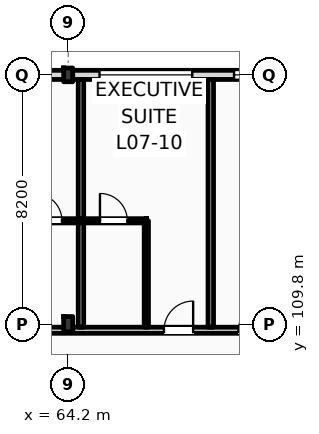
"""IFC4 building model, lengths in metres.
Left out: names, types, materials, properties, quantities, classifications, styles, units other than length and angle.
Written with IfcOpenShell. Run it as: python <this file> out.ifc"""

import sys

from ifc_helpers import new_model, si_unit, direction, frame, frame_2d, origin, origin_2d, place, context, subcontext, project, spatial, rectangle, i_section, extrude, element, fill, save


model = new_model("IFC4")
c1 = context("Model", 3, precision=1e-05, world=origin(), true_north=direction((0.0, 1.0)))
c2 = subcontext(c1, "Body", "Model", "MODEL_VIEW")
j1 = project(units=[si_unit("LENGTHUNIT", "METRE"), si_unit("PLANEANGLEUNIT", "RADIAN")], contexts=[c1])
p1 = place(None, origin())
s1 = spatial("IfcSite", under=j1, at=p1, CompositionType="ELEMENT")
p2 = place(p1, origin())
s2 = spatial("IfcBuilding", under=s1, at=p2, CompositionType="ELEMENT")
p3 = place(p2, frame((0.0, 0.0, 31.8)))
s3 = spatial("IfcBuildingStorey", under=s2, at=p3, CompositionType="ELEMENT", Elevation=31.8)
p4 = place(p3, frame((64.2, 109.8, 0.0), z_axis=(0.0, 0.0, 1.0), x_axis=(1.0, 0.0, 0.0)))
e1 = element("IfcColumn", 1, at=p4, inside=s3, PredefinedType="COLUMN", context=c2, shape_type="SweptSolid", body=[
    extrude(i_section(OverallWidth=0.3, OverallDepth=0.5, WebThickness=0.014, FlangeThickness=0.028, FilletRadius=0.027, at=origin_2d()), origin(), (0.0, 0.0, 1.0), 3.6),
])
p5 = place(p3, frame((64.2, 118.0, 0.0), z_axis=(0.0, 0.0, 1.0), x_axis=(1.0, 0.0, 0.0)))
e2 = element("IfcColumn", 2, at=p5, inside=s3, PredefinedType="COLUMN", context=c2, shape_type="SweptSolid", body=[
    extrude(i_section(OverallWidth=0.3, OverallDepth=0.45, WebThickness=0.014, FlangeThickness=0.026, FilletRadius=0.027, at=origin_2d()), origin(), (0.0, 0.0, 1.0), 3.6),
])
p6 = place(p3, frame((22.5, 118.0, 0.0), z_axis=(0.0, 0.0, 1.0), x_axis=(1.0, 0.0, 0.0)))
e3 = element("IfcWall", 3, at=p6, inside=s3, PredefinedType="STANDARD", context=c2, shape_type="SweptSolid", body=[
    extrude(rectangle(XDim=97.5, YDim=0.3, at=frame_2d((48.75, 0.0))), origin(), (0.0, 0.0, 1.0), 2.72),
])
p7 = place(p6, frame((3.61, 0.0, 0.9)))
e4 = element("IfcOpeningElement", 4, at=p7, cuts=e3, PredefinedType="OPENING", context=c2, shape_type="SweptSolid", body=[
    extrude(rectangle(XDim=1.1, YDim=1.64, at=frame_2d((0.55, 0.82))), frame((0.0, 0.16, 0.0), z_axis=(0.0, -1.0, 0.0), x_axis=(1.0, 0.0, 0.0)), (0.0, 0.0, 1.0), 0.32),
])
p8 = place(p6, frame((6.855, 0.0, 0.0)))
e5 = element("IfcOpeningElement", 5, at=p8, cuts=e3, PredefinedType="OPENING", context=c2, shape_type="SweptSolid", body=[
    extrude(rectangle(XDim=1.2, YDim=2.25, at=frame_2d((0.6, 1.125))), frame((0.0, 0.16, 0.0), z_axis=(0.0, -1.0, 0.0), x_axis=(1.0, 0.0, 0.0)), (0.0, 0.0, 1.0), 0.32),
])
p9 = place(p6, frame((11.405, 0.0, 0.9)))
e6 = element("IfcOpeningElement", 6, at=p9, cuts=e3, PredefinedType="OPENING", context=c2, shape_type="SweptSolid", body=[
    extrude(rectangle(XDim=2.1, YDim=1.64, at=frame_2d((1.05, 0.82))), frame((0.0, 0.16, 0.0), z_axis=(0.0, -1.0, 0.0), x_axis=(1.0, 0.0, 0.0)), (0.0, 0.0, 1.0), 0.32),
])
p10 = place(p6, frame((15.13, 0.0, 0.9)))
e7 = element("IfcOpeningElement", 7, at=p10, cuts=e3, PredefinedType="OPENING", context=c2, shape_type="SweptSolid", body=[
    extrude(rectangle(XDim=2.25, YDim=1.64, at=frame_2d((1.125, 0.82))), frame((0.0, 0.16, 0.0), z_axis=(0.0, -1.0, 0.0), x_axis=(1.0, 0.0, 0.0)), (0.0, 0.0, 1.0), 0.32),
])
p11 = place(p6, frame((21.53, 0.0, 0.0)))
e8 = element("IfcOpeningElement", 8, at=p11, cuts=e3, PredefinedType="OPENING", context=c2, shape_type="SweptSolid", body=[
    extrude(rectangle(XDim=1.2, YDim=2.25, at=frame_2d((0.6, 1.125))), frame((0.0, 0.16, 0.0), z_axis=(0.0, -1.0, 0.0), x_axis=(1.0, 0.0, 0.0)), (0.0, 0.0, 1.0), 0.32),
])
p12 = place(p6, frame((24.18, 0.0, 0.9)))
e9 = element("IfcOpeningElement", 9, at=p12, cuts=e3, PredefinedType="OPENING", context=c2, shape_type="SweptSolid", body=[
    extrude(rectangle(XDim=1.1, YDim=1.64, at=frame_2d((0.55, 0.82))), frame((0.0, 0.16, 0.0), z_axis=(0.0, -1.0, 0.0), x_axis=(1.0, 0.0, 0.0)), (0.0, 0.0, 1.0), 0.32),
])
p13 = place(p6, frame((29.105, 0.0, 0.9)))
e10 = element("IfcOpeningElement", 10, at=p13, cuts=e3, PredefinedType="OPENING", context=c2, shape_type="SweptSolid", body=[
    extrude(rectangle(XDim=2.7, YDim=1.64, at=frame_2d((1.35, 0.82))), frame((0.0, 0.16, 0.0), z_axis=(0.0, -1.0, 0.0), x_axis=(1.0, 0.0, 0.0)), (0.0, 0.0, 1.0), 0.32),
])
p14 = place(p6, frame((34.83, 0.0, 0.9)))
e11 = element("IfcOpeningElement", 11, at=p14, cuts=e3, PredefinedType="OPENING", context=c2, shape_type="SweptSolid", body=[
    extrude(rectangle(XDim=1.8, YDim=1.64, at=frame_2d((0.9, 0.82))), frame((0.0, 0.16, 0.0), z_axis=(0.0, -1.0, 0.0), x_axis=(1.0, 0.0, 0.0)), (0.0, 0.0, 1.0), 0.32),
])
p15 = place(p6, frame((38.525, 0.0, 0.0)))
e12 = element("IfcOpeningElement", 12, at=p15, cuts=e3, PredefinedType="OPENING", context=c2, shape_type="SweptSolid", body=[
    extrude(rectangle(XDim=1.2, YDim=2.25, at=frame_2d((0.6, 1.125))), frame((0.0, 0.16, 0.0), z_axis=(0.0, -1.0, 0.0), x_axis=(1.0, 0.0, 0.0)), (0.0, 0.0, 1.0), 0.32),
])
p16 = place(p6, frame((42.73, 0.0, 0.9)))
e13 = element("IfcOpeningElement", 13, at=p16, cuts=e3, PredefinedType="OPENING", context=c2, shape_type="SweptSolid", body=[
    extrude(rectangle(XDim=3.05, YDim=1.64, at=frame_2d((1.525, 0.82))), frame((0.0, 0.16, 0.0), z_axis=(0.0, -1.0, 0.0), x_axis=(1.0, 0.0, 0.0)), (0.0, 0.0, 1.0), 0.32),
])
p17 = place(p6, frame((47.155, 0.0, 0.9)))
e14 = element("IfcOpeningElement", 14, at=p17, cuts=e3, PredefinedType="OPENING", context=c2, shape_type="SweptSolid", body=[
    extrude(rectangle(XDim=1.35, YDim=1.64, at=frame_2d((0.675, 0.82))), frame((0.0, 0.16, 0.0), z_axis=(0.0, -1.0, 0.0), x_axis=(1.0, 0.0, 0.0)), (0.0, 0.0, 1.0), 0.32),
])
p18 = place(p6, frame((53.065, 0.0, 0.0)))
e15 = element("IfcOpeningElement", 15, at=p18, cuts=e3, PredefinedType="OPENING", context=c2, shape_type="SweptSolid", body=[
    extrude(rectangle(XDim=1.2, YDim=2.25, at=frame_2d((0.6, 1.125))), frame((0.0, 0.16, 0.0), z_axis=(0.0, -1.0, 0.0), x_axis=(1.0, 0.0, 0.0)), (0.0, 0.0, 1.0), 0.32),
])
p19 = place(p6, frame((58.2, 0.0, 0.9)))
e16 = element("IfcOpeningElement", 16, at=p19, cuts=e3, PredefinedType="OPENING", context=c2, shape_type="SweptSolid", body=[
    extrude(rectangle(XDim=1.8, YDim=1.64, at=frame_2d((0.9, 0.82))), frame((0.0, 0.16, 0.0), z_axis=(0.0, -1.0, 0.0), x_axis=(1.0, 0.0, 0.0)), (0.0, 0.0, 1.0), 0.32),
])
p20 = place(p6, frame((61.13, 0.0, 0.9)))
e17 = element("IfcOpeningElement", 17, at=p20, cuts=e3, PredefinedType="OPENING", context=c2, shape_type="SweptSolid", body=[
    extrude(rectangle(XDim=3.05, YDim=1.64, at=frame_2d((1.525, 0.82))), frame((0.0, 0.16, 0.0), z_axis=(0.0, -1.0, 0.0), x_axis=(1.0, 0.0, 0.0)), (0.0, 0.0, 1.0), 0.32),
])
p21 = place(p6, frame((67.93, 0.0, 0.0)))
e18 = element("IfcOpeningElement", 18, at=p21, cuts=e3, PredefinedType="OPENING", context=c2, shape_type="SweptSolid", body=[
    extrude(rectangle(XDim=1.2, YDim=2.25, at=frame_2d((0.6, 1.125))), frame((0.0, 0.16, 0.0), z_axis=(0.0, -1.0, 0.0), x_axis=(1.0, 0.0, 0.0)), (0.0, 0.0, 1.0), 0.32),
])
p22 = place(p6, frame((70.39, 0.0, 0.0)))
e19 = element("IfcOpeningElement", 19, at=p22, cuts=e3, PredefinedType="OPENING", context=c2, shape_type="SweptSolid", body=[
    extrude(rectangle(XDim=1.2, YDim=2.25, at=frame_2d((0.6, 1.125))), frame((0.0, 0.16, 0.0), z_axis=(0.0, -1.0, 0.0), x_axis=(1.0, 0.0, 0.0)), (0.0, 0.0, 1.0), 0.32),
])
p23 = place(p6, frame((75.905, 0.0, 0.9)))
e20 = element("IfcOpeningElement", 20, at=p23, cuts=e3, PredefinedType="OPENING", context=c2, shape_type="SweptSolid", body=[
    extrude(rectangle(XDim=1.1, YDim=1.5, at=frame_2d((0.55, 0.75))), frame((0.0, 0.16, 0.0), z_axis=(0.0, -1.0, 0.0), x_axis=(1.0, 0.0, 0.0)), (0.0, 0.0, 1.0), 0.32),
])
p24 = place(p6, frame((81.63, 0.0, 0.9)))
e21 = element("IfcOpeningElement", 21, at=p24, cuts=e3, PredefinedType="OPENING", context=c2, shape_type="SweptSolid", body=[
    extrude(rectangle(XDim=1.1, YDim=1.6, at=frame_2d((0.55, 0.8))), frame((0.0, 0.16, 0.0), z_axis=(0.0, -1.0, 0.0), x_axis=(1.0, 0.0, 0.0)), (0.0, 0.0, 1.0), 0.32),
])
p25 = place(p6, frame((84.955, 0.0, 0.9)))
e22 = element("IfcOpeningElement", 22, at=p25, cuts=e3, PredefinedType="OPENING", context=c2, shape_type="SweptSolid", body=[
    extrude(rectangle(XDim=1.4, YDim=1.64, at=frame_2d((0.7, 0.82))), frame((0.0, 0.16, 0.0), z_axis=(0.0, -1.0, 0.0), x_axis=(1.0, 0.0, 0.0)), (0.0, 0.0, 1.0), 0.32),
])
p26 = place(p6, frame((90.055, 0.0, 0.9)))
e23 = element("IfcOpeningElement", 23, at=p26, cuts=e3, PredefinedType="OPENING", context=c2, shape_type="SweptSolid", body=[
    extrude(rectangle(XDim=1.6, YDim=1.64, at=frame_2d((0.8, 0.82))), frame((0.0, 0.16, 0.0), z_axis=(0.0, -1.0, 0.0), x_axis=(1.0, 0.0, 0.0)), (0.0, 0.0, 1.0), 0.32),
])
p27 = place(p6, frame((93.87, 0.0, 0.9)))
e24 = element("IfcOpeningElement", 24, at=p27, cuts=e3, PredefinedType="OPENING", context=c2, shape_type="SweptSolid", body=[
    extrude(rectangle(XDim=1.75, YDim=1.64, at=frame_2d((0.875, 0.82))), frame((0.0, 0.16, 0.0), z_axis=(0.0, -1.0, 0.0), x_axis=(1.0, 0.0, 0.0)), (0.0, 0.0, 1.0), 0.32),
])
p28 = place(p3, frame((10.65, 109.6, 0.0), z_axis=(0.0, 0.0, 1.0), x_axis=(1.0, 0.0, 0.0)))
e25 = element("IfcWall", 25, at=p28, inside=s3, PredefinedType="PARTITIONING", context=c2, shape_type="SweptSolid", body=[
    extrude(rectangle(XDim=109.21, YDim=0.2, at=frame_2d((54.605, 0.0))), origin(), (0.0, 0.0, 1.0), 2.72),
])
p29 = place(p28, frame((15.825, 0.0, 0.0)))
e26 = element("IfcOpeningElement", 26, at=p29, cuts=e25, PredefinedType="OPENING", context=c2, shape_type="SweptSolid", body=[
    extrude(rectangle(XDim=1.02, YDim=2.2, at=frame_2d((0.51, 1.1))), frame((0.0, 0.11, 0.0), z_axis=(0.0, -1.0, 0.0), x_axis=(1.0, 0.0, 0.0)), (0.0, 0.0, 1.0), 0.22),
])
p30 = place(p28, frame((19.87, 0.0, 0.0)))
e27 = element("IfcOpeningElement", 27, at=p30, cuts=e25, PredefinedType="OPENING", context=c2, shape_type="SweptSolid", body=[
    extrude(rectangle(XDim=1.02, YDim=2.2, at=frame_2d((0.51, 1.1))), frame((0.0, 0.11, 0.0), z_axis=(0.0, -1.0, 0.0), x_axis=(1.0, 0.0, 0.0)), (0.0, 0.0, 1.0), 0.22),
])
p31 = place(p28, frame((24.47, 0.0, 0.0)))
e28 = element("IfcOpeningElement", 28, at=p31, cuts=e25, PredefinedType="OPENING", context=c2, shape_type="SweptSolid", body=[
    extrude(rectangle(XDim=1.02, YDim=2.2, at=frame_2d((0.51, 1.1))), frame((0.0, 0.11, 0.0), z_axis=(0.0, -1.0, 0.0), x_axis=(1.0, 0.0, 0.0)), (0.0, 0.0, 1.0), 0.22),
])
p32 = place(p28, frame((26.92, 0.0, 0.0)))
e29 = element("IfcOpeningElement", 29, at=p32, cuts=e25, PredefinedType="OPENING", context=c2, shape_type="SweptSolid", body=[
    extrude(rectangle(XDim=1.02, YDim=2.2, at=frame_2d((0.51, 1.1))), frame((0.0, 0.11, 0.0), z_axis=(0.0, -1.0, 0.0), x_axis=(1.0, 0.0, 0.0)), (0.0, 0.0, 1.0), 0.22),
])
p33 = place(p28, frame((33.7, 0.0, 0.0)))
e30 = element("IfcOpeningElement", 30, at=p33, cuts=e25, PredefinedType="OPENING", context=c2, shape_type="SweptSolid", body=[
    extrude(rectangle(XDim=0.96, YDim=2.2, at=frame_2d((0.48, 1.1))), frame((0.0, 0.11, 0.0), z_axis=(0.0, -1.0, 0.0), x_axis=(1.0, 0.0, 0.0)), (0.0, 0.0, 1.0), 0.22),
])
p34 = place(p28, frame((35.9, 0.0, 0.0)))
e31 = element("IfcOpeningElement", 31, at=p34, cuts=e25, PredefinedType="OPENING", context=c2, shape_type="SweptSolid", body=[
    extrude(rectangle(XDim=0.96, YDim=2.2, at=frame_2d((0.48, 1.1))), frame((0.0, 0.11, 0.0), z_axis=(0.0, -1.0, 0.0), x_axis=(1.0, 0.0, 0.0)), (0.0, 0.0, 1.0), 0.22),
])
p35 = place(p28, frame((42.9, 0.0, 0.0)))
e32 = element("IfcOpeningElement", 32, at=p35, cuts=e25, PredefinedType="OPENING", context=c2, shape_type="SweptSolid", body=[
    extrude(rectangle(XDim=0.96, YDim=2.2, at=frame_2d((0.48, 1.1))), frame((0.0, 0.11, 0.0), z_axis=(0.0, -1.0, 0.0), x_axis=(1.0, 0.0, 0.0)), (0.0, 0.0, 1.0), 0.22),
])
p36 = place(p28, frame((47.5, 0.0, 0.0)))
e33 = element("IfcOpeningElement", 33, at=p36, cuts=e25, PredefinedType="OPENING", context=c2, shape_type="SweptSolid", body=[
    extrude(rectangle(XDim=0.96, YDim=2.2, at=frame_2d((0.48, 1.1))), frame((0.0, 0.11, 0.0), z_axis=(0.0, -1.0, 0.0), x_axis=(1.0, 0.0, 0.0)), (0.0, 0.0, 1.0), 0.22),
])
p37 = place(p28, frame((49.95, 0.0, 0.0)))
e34 = element("IfcOpeningElement", 34, at=p37, cuts=e25, PredefinedType="OPENING", context=c2, shape_type="SweptSolid", body=[
    extrude(rectangle(XDim=0.96, YDim=2.2, at=frame_2d((0.48, 1.1))), frame((0.0, 0.11, 0.0), z_axis=(0.0, -1.0, 0.0), x_axis=(1.0, 0.0, 0.0)), (0.0, 0.0, 1.0), 0.22),
])
p38 = place(p28, frame((56.7, 0.0, 0.0)))
e35 = element("IfcOpeningElement", 35, at=p38, cuts=e25, PredefinedType="OPENING", context=c2, shape_type="SweptSolid", body=[
    extrude(rectangle(XDim=0.96, YDim=2.2, at=frame_2d((0.48, 1.1))), frame((0.0, 0.11, 0.0), z_axis=(0.0, -1.0, 0.0), x_axis=(1.0, 0.0, 0.0)), (0.0, 0.0, 1.0), 0.22),
])
p39 = place(p28, frame((59.15, 0.0, 0.0)))
e36 = element("IfcOpeningElement", 36, at=p39, cuts=e25, PredefinedType="OPENING", context=c2, shape_type="SweptSolid", body=[
    extrude(rectangle(XDim=0.96, YDim=2.2, at=frame_2d((0.48, 1.1))), frame((0.0, 0.11, 0.0), z_axis=(0.0, -1.0, 0.0), x_axis=(1.0, 0.0, 0.0)), (0.0, 0.0, 1.0), 0.22),
])
p40 = place(p28, frame((65.9, 0.0, 0.0)))
e37 = element("IfcOpeningElement", 37, at=p40, cuts=e25, PredefinedType="OPENING", context=c2, shape_type="SweptSolid", body=[
    extrude(rectangle(XDim=0.96, YDim=2.2, at=frame_2d((0.48, 1.1))), frame((0.0, 0.11, 0.0), z_axis=(0.0, -1.0, 0.0), x_axis=(1.0, 0.0, 0.0)), (0.0, 0.0, 1.0), 0.22),
])
p41 = place(p28, frame((70.5, 0.0, 0.0)))
e38 = element("IfcOpeningElement", 38, at=p41, cuts=e25, PredefinedType="OPENING", context=c2, shape_type="SweptSolid", body=[
    extrude(rectangle(XDim=0.96, YDim=2.2, at=frame_2d((0.48, 1.1))), frame((0.0, 0.11, 0.0), z_axis=(0.0, -1.0, 0.0), x_axis=(1.0, 0.0, 0.0)), (0.0, 0.0, 1.0), 0.22),
])
p42 = place(p28, frame((72.95, 0.0, 0.0)))
e39 = element("IfcOpeningElement", 39, at=p42, cuts=e25, PredefinedType="OPENING", context=c2, shape_type="SweptSolid", body=[
    extrude(rectangle(XDim=0.96, YDim=2.2, at=frame_2d((0.48, 1.1))), frame((0.0, 0.11, 0.0), z_axis=(0.0, -1.0, 0.0), x_axis=(1.0, 0.0, 0.0)), (0.0, 0.0, 1.0), 0.22),
])
p43 = place(p28, frame((79.7, 0.0, 0.0)))
e40 = element("IfcOpeningElement", 40, at=p43, cuts=e25, PredefinedType="OPENING", context=c2, shape_type="SweptSolid", body=[
    extrude(rectangle(XDim=0.96, YDim=2.2, at=frame_2d((0.48, 1.1))), frame((0.0, 0.11, 0.0), z_axis=(0.0, -1.0, 0.0), x_axis=(1.0, 0.0, 0.0)), (0.0, 0.0, 1.0), 0.22),
])
p44 = place(p28, frame((82.15, 0.0, 0.0)))
e41 = element("IfcOpeningElement", 41, at=p44, cuts=e25, PredefinedType="OPENING", context=c2, shape_type="SweptSolid", body=[
    extrude(rectangle(XDim=0.96, YDim=2.2, at=frame_2d((0.48, 1.1))), frame((0.0, 0.11, 0.0), z_axis=(0.0, -1.0, 0.0), x_axis=(1.0, 0.0, 0.0)), (0.0, 0.0, 1.0), 0.22),
])
p45 = place(p28, frame((88.9, 0.0, 0.0)))
e42 = element("IfcOpeningElement", 42, at=p45, cuts=e25, PredefinedType="OPENING", context=c2, shape_type="SweptSolid", body=[
    extrude(rectangle(XDim=0.96, YDim=2.2, at=frame_2d((0.48, 1.1))), frame((0.0, 0.11, 0.0), z_axis=(0.0, -1.0, 0.0), x_axis=(1.0, 0.0, 0.0)), (0.0, 0.0, 1.0), 0.22),
])
p46 = place(p28, frame((93.75, 0.0, 0.0)))
e43 = element("IfcOpeningElement", 43, at=p46, cuts=e25, PredefinedType="OPENING", context=c2, shape_type="SweptSolid", body=[
    extrude(rectangle(XDim=0.96, YDim=2.2, at=frame_2d((0.48, 1.1))), frame((0.0, 0.11, 0.0), z_axis=(0.0, -1.0, 0.0), x_axis=(1.0, 0.0, 0.0)), (0.0, 0.0, 1.0), 0.22),
])
p47 = place(p28, frame((98.1, 0.0, 0.0)))
e44 = element("IfcOpeningElement", 44, at=p47, cuts=e25, PredefinedType="OPENING", context=c2, shape_type="SweptSolid", body=[
    extrude(rectangle(XDim=0.96, YDim=2.2, at=frame_2d((0.48, 1.1))), frame((0.0, 0.11, 0.0), z_axis=(0.0, -1.0, 0.0), x_axis=(1.0, 0.0, 0.0)), (0.0, 0.0, 1.0), 0.22),
])
p48 = place(p28, frame((102.7, 0.0, 0.0)))
e45 = element("IfcOpeningElement", 45, at=p48, cuts=e25, PredefinedType="OPENING", context=c2, shape_type="SweptSolid", body=[
    extrude(rectangle(XDim=0.96, YDim=2.2, at=frame_2d((0.48, 1.1))), frame((0.0, 0.11, 0.0), z_axis=(0.0, -1.0, 0.0), x_axis=(1.0, 0.0, 0.0)), (0.0, 0.0, 1.0), 0.22),
])
p49 = place(p28, frame((105.04, 0.0, 0.0)))
e46 = element("IfcOpeningElement", 46, at=p49, cuts=e25, PredefinedType="OPENING", context=c2, shape_type="SweptSolid", body=[
    extrude(rectangle(XDim=0.96, YDim=2.2, at=frame_2d((0.48, 1.1))), frame((0.0, 0.11, 0.0), z_axis=(0.0, -1.0, 0.0), x_axis=(1.0, 0.0, 0.0)), (0.0, 0.0, 1.0), 0.22),
])
p50 = place(p28, frame((2.716, 0.0, 0.0)))
e47 = element("IfcOpeningElement", 47, at=p50, cuts=e25, PredefinedType="OPENING", context=c2, shape_type="SweptSolid", body=[
    extrude(rectangle(XDim=1.35, YDim=2.25, at=frame_2d((0.675, 1.125))), frame((0.0, 0.11, 0.0), z_axis=(0.0, -1.0, 0.0), x_axis=(1.0, 0.0, 0.0)), (0.0, 0.0, 1.0), 0.22),
])
p51 = place(p28, frame((6.65, 0.0, 0.0)))
e48 = element("IfcOpeningElement", 48, at=p51, cuts=e25, PredefinedType="OPENING", context=c2, shape_type="SweptSolid", body=[
    extrude(rectangle(XDim=1.35, YDim=2.25, at=frame_2d((0.675, 1.125))), frame((0.0, 0.11, 0.0), z_axis=(0.0, -1.0, 0.0), x_axis=(1.0, 0.0, 0.0)), (0.0, 0.0, 1.0), 0.22),
])
p52 = place(p28, frame((10.583, 0.0, 0.0)))
e49 = element("IfcOpeningElement", 49, at=p52, cuts=e25, PredefinedType="OPENING", context=c2, shape_type="SweptSolid", body=[
    extrude(rectangle(XDim=1.35, YDim=2.25, at=frame_2d((0.675, 1.125))), frame((0.0, 0.11, 0.0), z_axis=(0.0, -1.0, 0.0), x_axis=(1.0, 0.0, 0.0)), (0.0, 0.0, 1.0), 0.22),
])
p53 = place(p3, frame((64.62, 109.7, 0.0), z_axis=(0.0, 0.0, 1.0), x_axis=(0.0, 1.0, 0.0)))
e50 = element("IfcWall", 50, at=p53, inside=s3, PredefinedType="PARTITIONING", context=c2, shape_type="SweptSolid", body=[
    extrude(rectangle(XDim=8.15, YDim=0.18, at=frame_2d((4.075, 0.0))), origin(), (0.0, 0.0, 1.0), 3.36),
])
p54 = place(p3, frame((62.47, 113.2, 0.0), z_axis=(0.0, 0.0, 1.0), x_axis=(1.0, 0.0, 0.0)))
e51 = element("IfcWall", 51, at=p54, inside=s3, PredefinedType="PARTITIONING", context=c2, shape_type="SweptSolid", body=[
    extrude(rectangle(XDim=2.15, YDim=0.14, at=frame_2d((1.075, 0.0))), origin(), (0.0, 0.0, 1.0), 3.36),
])
p55 = place(p54, frame((0.625, 0.0, 0.0)))
e52 = element("IfcOpeningElement", 52, at=p55, cuts=e51, PredefinedType="OPENING", context=c2, shape_type="SweptSolid", body=[
    extrude(rectangle(XDim=0.9, YDim=2.1, at=frame_2d((0.45, 1.05))), frame((0.0, 0.08, 0.0), z_axis=(0.0, -1.0, 0.0), x_axis=(1.0, 0.0, 0.0)), (0.0, 0.0, 1.0), 0.16),
])
p56 = place(p3, frame((68.89, 109.7, 0.0), z_axis=(0.0, 0.0, 1.0), x_axis=(0.0, 1.0, 0.0)))
e53 = element("IfcWall", 53, at=p56, inside=s3, PredefinedType="PARTITIONING", context=c2, shape_type="SweptSolid", body=[
    extrude(rectangle(XDim=8.15, YDim=0.18, at=frame_2d((4.075, 0.0))), origin(), (0.0, 0.0, 1.0), 3.36),
])
p57 = place(p3, frame((66.77, 109.7, 0.0), z_axis=(0.0, 0.0, 1.0), x_axis=(0.0, 1.0, 0.0)))
e54 = element("IfcWall", 54, at=p57, inside=s3, PredefinedType="PARTITIONING", context=c2, shape_type="SweptSolid", body=[
    extrude(rectangle(XDim=3.5, YDim=0.14, at=frame_2d((1.75, 0.0))), origin(), (0.0, 0.0, 1.0), 3.05),
])
p58 = place(p3, frame((64.62, 113.2, 0.0), z_axis=(0.0, 0.0, 1.0), x_axis=(1.0, 0.0, 0.0)))
e55 = element("IfcWall", 55, at=p58, inside=s3, PredefinedType="PARTITIONING", context=c2, shape_type="SweptSolid", body=[
    extrude(rectangle(XDim=2.15, YDim=0.14, at=frame_2d((1.075, 0.0))), origin(), (0.0, 0.0, 1.0), 3.36),
])
p59 = place(p58, frame((0.625, 0.0, 0.0)))
e56 = element("IfcOpeningElement", 56, at=p59, cuts=e55, PredefinedType="OPENING", context=c2, shape_type="SweptSolid", body=[
    extrude(rectangle(XDim=0.9, YDim=2.1, at=frame_2d((0.45, 1.05))), frame((0.0, 0.08, 0.0), z_axis=(0.0, -1.0, 0.0), x_axis=(1.0, 0.0, 0.0)), (0.0, 0.0, 1.0), 0.16),
])
p60 = place(p16, origin())
e57 = element("IfcWindow", 57, at=p60, inside=s3, PartitioningType="DOUBLE_PANEL_VERTICAL", PredefinedType="WINDOW", context=c2, shape_type="SweptSolid", body=[
    extrude(rectangle(XDim=3.05, YDim=1.64, at=frame_2d((1.525, 0.82))), frame((0.0, 0.03, 0.0), z_axis=(0.0, -1.0, 0.0), x_axis=(1.0, 0.0, 0.0)), (0.0, 0.0, 1.0), 0.06),
])
fill(e13, e57)
p61 = place(p17, origin())
e58 = element("IfcWindow", 58, at=p61, inside=s3, PartitioningType="DOUBLE_PANEL_VERTICAL", PredefinedType="WINDOW", context=c2, shape_type="SweptSolid", body=[
    extrude(rectangle(XDim=1.35, YDim=1.64, at=frame_2d((0.675, 0.82))), frame((0.0, 0.03, 0.0), z_axis=(0.0, -1.0, 0.0), x_axis=(1.0, 0.0, 0.0)), (0.0, 0.0, 1.0), 0.06),
])
fill(e14, e58)
p62 = place(p55, origin())
e59 = element("IfcDoor", 59, at=p62, inside=s3, OperationType="SINGLE_SWING_LEFT", PredefinedType="DOOR", context=c2, shape_type="SweptSolid", body=[
    extrude(rectangle(XDim=0.9, YDim=2.1, at=frame_2d((0.45, 1.05))), frame((0.0, 0.025, 0.0), z_axis=(0.0, -1.0, 0.0), x_axis=(1.0, 0.0, 0.0)), (0.0, 0.0, 1.0), 0.05),
])
fill(e52, e59)
p63 = place(p38, origin())
e60 = element("IfcDoor", 60, at=p63, inside=s3, OperationType="SINGLE_SWING_RIGHT", PredefinedType="DOOR", context=c2, shape_type="SweptSolid", body=[
    extrude(rectangle(XDim=0.96, YDim=2.2, at=frame_2d((0.48, 1.1))), frame((0.0, 0.025, 0.0), z_axis=(0.0, -1.0, 0.0), x_axis=(1.0, 0.0, 0.0)), (0.0, 0.0, 1.0), 0.05),
])
fill(e35, e60)
p64 = place(p59, origin())
e61 = element("IfcDoor", 61, at=p64, inside=s3, OperationType="SINGLE_SWING_LEFT", PredefinedType="DOOR", context=c2, shape_type="SweptSolid", body=[
    extrude(rectangle(XDim=0.9, YDim=2.1, at=frame_2d((0.45, 1.05))), frame((0.0, 0.025, 0.0), z_axis=(0.0, -1.0, 0.0), x_axis=(1.0, 0.0, 0.0)), (0.0, 0.0, 1.0), 0.05),
])
fill(e56, e61)
p65 = place(p39, origin())
e62 = element("IfcDoor", 62, at=p65, inside=s3, OperationType="SINGLE_SWING_RIGHT", PredefinedType="DOOR", context=c2, shape_type="SweptSolid", body=[
    extrude(rectangle(XDim=0.96, YDim=2.2, at=frame_2d((0.48, 1.1))), frame((0.0, 0.025, 0.0), z_axis=(0.0, -1.0, 0.0), x_axis=(1.0, 0.0, 0.0)), (0.0, 0.0, 1.0), 0.05),
])
fill(e36, e62)
save(model, sys.argv[1])
